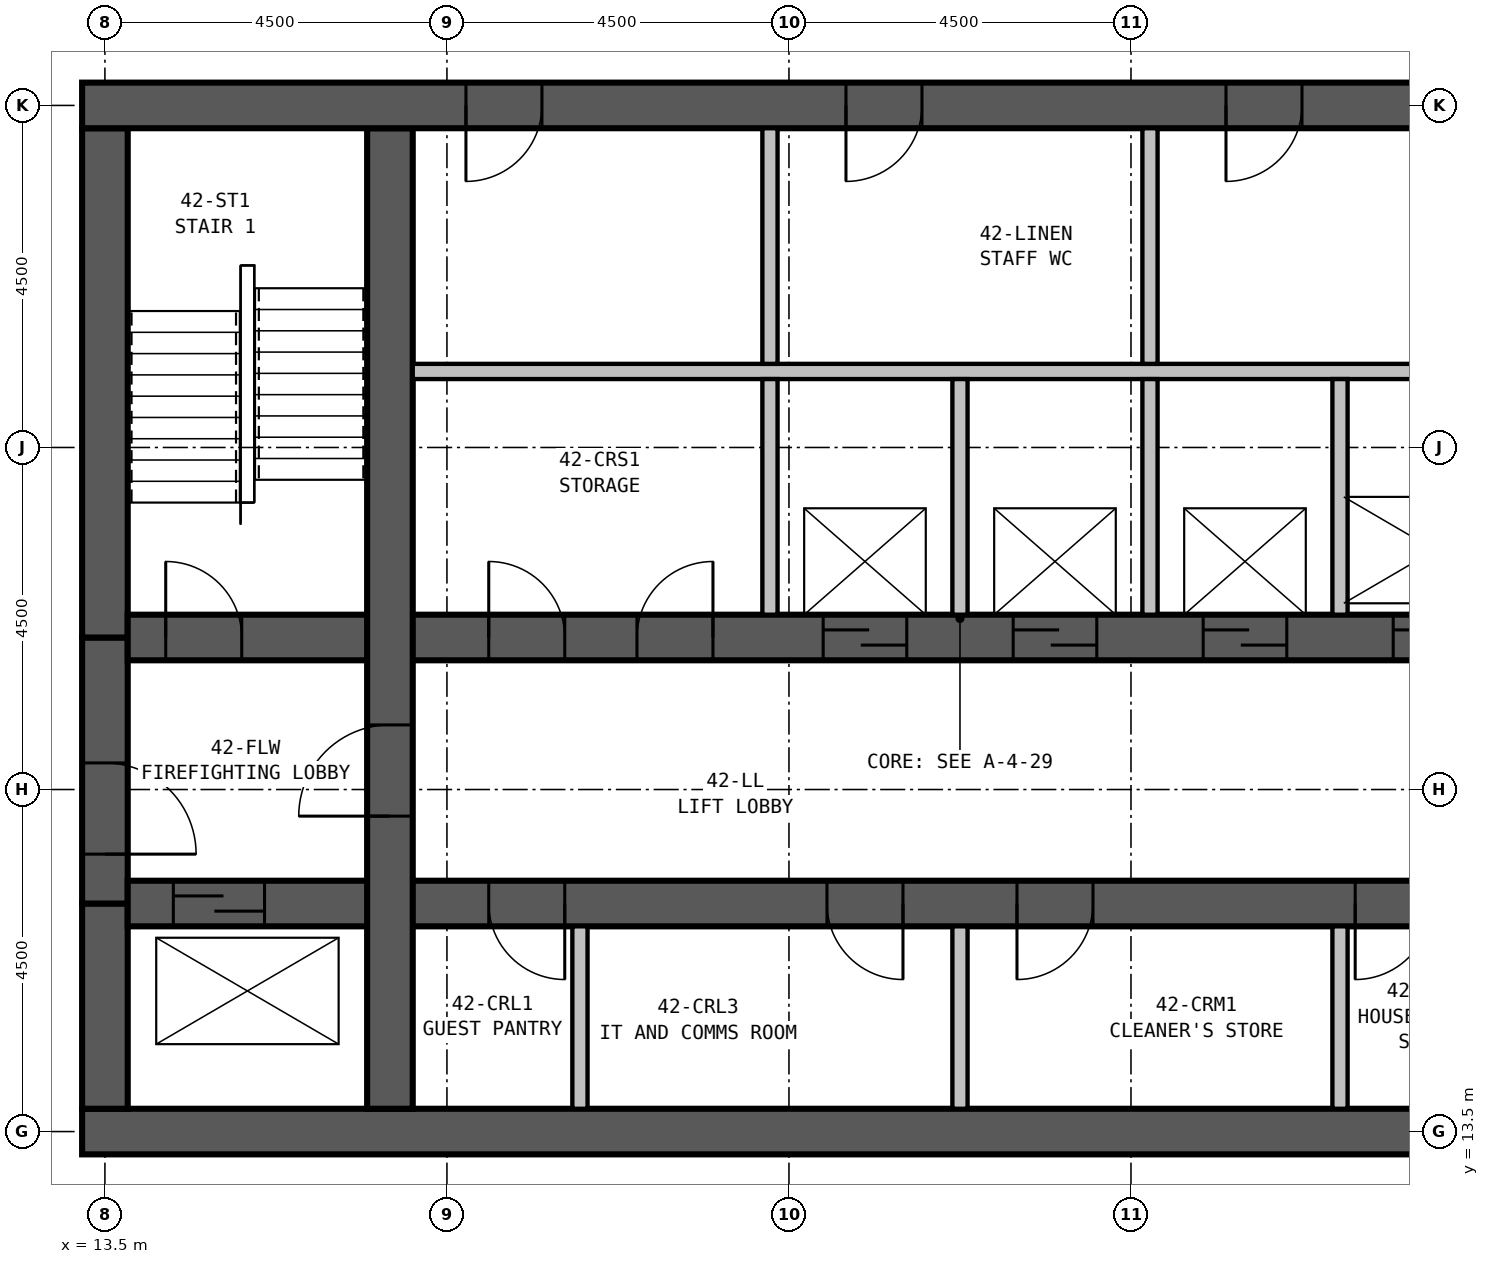
"""IFC4 building model, lengths in metres.
Left out: names, types, materials, properties, quantities, classifications, styles, units other than length and angle.
Written with IfcOpenShell. Run it as: python <this file> out.ifc"""

import sys

from ifc_helpers import new_model, si_unit, direction, frame, frame_2d, origin, place, context, subcontext, project, spatial, rectangle, extrude, element, fill, save


model = new_model("IFC4")
c1 = context("Model", 3, precision=1e-05, world=origin(), true_north=direction((0.0, 1.0)))
c2 = subcontext(c1, "Body", "Model", "MODEL_VIEW")
j1 = project(units=[si_unit("LENGTHUNIT", "METRE"), si_unit("PLANEANGLEUNIT", "RADIAN")], contexts=[c1])
p1 = place(None, origin())
s1 = spatial("IfcSite", under=j1, at=p1, CompositionType="ELEMENT")
p2 = place(p1, origin())
s2 = spatial("IfcBuilding", under=s1, at=p2, CompositionType="ELEMENT")
p3 = place(p2, frame((0.0, 0.0, 165.9)))
s3 = spatial("IfcBuildingStorey", under=s2, at=p3, CompositionType="ELEMENT", Elevation=165.9)
p4 = place(p3, frame((13.2, 13.5, 0.0), z_axis=(0.0, 0.0, 1.0), x_axis=(1.0, 0.0, 0.0)))
e1 = element("IfcWall", 1, at=p4, inside=s3, PredefinedType="SHEAR", context=c2, shape_type="SweptSolid", body=[
    extrude(rectangle(XDim=23.1, YDim=0.6, at=frame_2d((11.55, 0.0))), origin(), (0.0, 0.0, 1.0), 3.5),
])
p5 = place(p3, frame((36.3, 27.0, 0.0), z_axis=(0.0, 0.0, 1.0), x_axis=(-1.0, 0.0, 0.0)))
e2 = element("IfcWall", 2, at=p5, inside=s3, PredefinedType="SHEAR", context=c2, shape_type="SweptSolid", body=[
    extrude(rectangle(XDim=23.1, YDim=0.6, at=frame_2d((11.55, 0.0))), origin(), (0.0, 0.0, 1.0), 3.5),
])
p6 = place(p5, frame((17.05, 0.0, 0.0)))
e3 = element("IfcOpeningElement", 3, at=p6, cuts=e2, PredefinedType="OPENING", context=c2, shape_type="SweptSolid", body=[
    extrude(rectangle(XDim=1.0, YDim=2.1, at=frame_2d((0.5, 1.05))), frame((0.0, 0.31, 0.0), z_axis=(0.0, -1.0, 0.0), x_axis=(1.0, 0.0, 0.0)), (0.0, 0.0, 1.0), 0.62),
])
p7 = place(p5, frame((12.05, 0.0, 0.0)))
e4 = element("IfcOpeningElement", 4, at=p7, cuts=e2, PredefinedType="OPENING", context=c2, shape_type="SweptSolid", body=[
    extrude(rectangle(XDim=1.0, YDim=2.1, at=frame_2d((0.5, 1.05))), frame((0.0, 0.31, 0.0), z_axis=(0.0, -1.0, 0.0), x_axis=(1.0, 0.0, 0.0)), (0.0, 0.0, 1.0), 0.62),
])
p8 = place(p5, frame((7.05, 0.0, 0.0)))
e5 = element("IfcOpeningElement", 5, at=p8, cuts=e2, PredefinedType="OPENING", context=c2, shape_type="SweptSolid", body=[
    extrude(rectangle(XDim=1.0, YDim=2.1, at=frame_2d((0.5, 1.05))), frame((0.0, 0.31, 0.0), z_axis=(0.0, -1.0, 0.0), x_axis=(1.0, 0.0, 0.0)), (0.0, 0.0, 1.0), 0.62),
])
p9 = place(p3, frame((17.25, 13.8, 0.0), z_axis=(0.0, 0.0, 1.0), x_axis=(0.0, 1.0, 0.0)))
e6 = element("IfcWall", 6, at=p9, inside=s3, PredefinedType="SHEAR", context=c2, shape_type="SweptSolid", body=[
    extrude(rectangle(XDim=12.9, YDim=0.6, at=frame_2d((6.45, 0.0))), origin(), (0.0, 0.0, 1.0), 3.5),
])
p10 = place(p9, frame((3.85, 0.0, 0.0)))
e7 = element("IfcOpeningElement", 7, at=p10, cuts=e6, PredefinedType="OPENING", context=c2, shape_type="SweptSolid", body=[
    extrude(rectangle(XDim=1.2, YDim=2.1, at=frame_2d((0.6, 1.05))), frame((0.0, 0.31, 0.0), z_axis=(0.0, -1.0, 0.0), x_axis=(1.0, 0.0, 0.0)), (0.0, 0.0, 1.0), 0.62),
])
p11 = place(p3, frame((13.8, 16.5, 0.0), z_axis=(0.0, 0.0, 1.0), x_axis=(1.0, 0.0, 0.0)))
e8 = element("IfcWall", 8, at=p11, inside=s3, PredefinedType="SHEAR", context=c2, shape_type="SweptSolid", body=[
    extrude(rectangle(XDim=21.9, YDim=0.6, at=frame_2d((10.95, 0.0))), origin(), (0.0, 0.0, 1.0), 3.5),
])
p12 = place(p11, frame((5.75, 0.0, 0.0), z_axis=(0.0, 0.0, 1.0), x_axis=(-1.0, 0.0, 0.0)))
e9 = element("IfcOpeningElement", 9, at=p12, cuts=e8, PredefinedType="OPENING", context=c2, shape_type="SweptSolid", body=[
    extrude(rectangle(XDim=1.0, YDim=2.1, at=frame_2d((0.5, 1.05))), frame((0.0, 0.31, 0.0), z_axis=(0.0, -1.0, 0.0), x_axis=(1.0, 0.0, 0.0)), (0.0, 0.0, 1.0), 0.62),
])
p13 = place(p11, frame((10.2, 0.0, 0.0), z_axis=(0.0, 0.0, 1.0), x_axis=(-1.0, 0.0, 0.0)))
e10 = element("IfcOpeningElement", 10, at=p13, cuts=e8, PredefinedType="OPENING", context=c2, shape_type="SweptSolid", body=[
    extrude(rectangle(XDim=1.0, YDim=2.1, at=frame_2d((0.5, 1.05))), frame((0.0, 0.31, 0.0), z_axis=(0.0, -1.0, 0.0), x_axis=(1.0, 0.0, 0.0)), (0.0, 0.0, 1.0), 0.62),
])
p14 = place(p11, frame((12.7, 0.0, 0.0), z_axis=(0.0, 0.0, 1.0), x_axis=(-1.0, 0.0, 0.0)))
e11 = element("IfcOpeningElement", 11, at=p14, cuts=e8, PredefinedType="OPENING", context=c2, shape_type="SweptSolid", body=[
    extrude(rectangle(XDim=1.0, YDim=2.1, at=frame_2d((0.5, 1.05))), frame((0.0, 0.31, 0.0), z_axis=(0.0, -1.0, 0.0), x_axis=(1.0, 0.0, 0.0)), (0.0, 0.0, 1.0), 0.62),
])
p15 = place(p11, frame((17.15, 0.0, 0.0), z_axis=(0.0, 0.0, 1.0), x_axis=(-1.0, 0.0, 0.0)))
e12 = element("IfcOpeningElement", 12, at=p15, cuts=e8, PredefinedType="OPENING", context=c2, shape_type="SweptSolid", body=[
    extrude(rectangle(XDim=1.0, YDim=2.1, at=frame_2d((0.5, 1.05))), frame((0.0, 0.31, 0.0), z_axis=(0.0, -1.0, 0.0), x_axis=(1.0, 0.0, 0.0)), (0.0, 0.0, 1.0), 0.62),
])
p16 = place(p11, frame((0.6, 0.0, 0.0)))
e13 = element("IfcOpeningElement", 13, at=p16, cuts=e8, PredefinedType="OPENING", context=c2, shape_type="SweptSolid", body=[
    extrude(rectangle(XDim=1.2, YDim=2.1, at=frame_2d((0.6, 1.05))), frame((0.0, 0.31, 0.0), z_axis=(0.0, -1.0, 0.0), x_axis=(1.0, 0.0, 0.0)), (0.0, 0.0, 1.0), 0.62),
])
p17 = place(p11, frame((19.6, 0.0, 0.0)))
e14 = element("IfcOpeningElement", 14, at=p17, cuts=e8, PredefinedType="OPENING", context=c2, shape_type="SweptSolid", body=[
    extrude(rectangle(XDim=1.2, YDim=2.1, at=frame_2d((0.6, 1.05))), frame((0.0, 0.31, 0.0), z_axis=(0.0, -1.0, 0.0), x_axis=(1.0, 0.0, 0.0)), (0.0, 0.0, 1.0), 0.62),
])
p18 = place(p3, frame((13.8, 20.0, 0.0), z_axis=(0.0, 0.0, 1.0), x_axis=(1.0, 0.0, 0.0)))
e15 = element("IfcWall", 15, at=p18, inside=s3, PredefinedType="SHEAR", context=c2, shape_type="SweptSolid", body=[
    extrude(rectangle(XDim=21.9, YDim=0.6, at=frame_2d((10.95, 0.0))), origin(), (0.0, 0.0, 1.0), 3.5),
])
p19 = place(p18, frame((0.5, 0.0, 0.0)))
e16 = element("IfcOpeningElement", 16, at=p19, cuts=e15, PredefinedType="OPENING", context=c2, shape_type="SweptSolid", body=[
    extrude(rectangle(XDim=1.0, YDim=2.1, at=frame_2d((0.5, 1.05))), frame((0.0, 0.31, 0.0), z_axis=(0.0, -1.0, 0.0), x_axis=(1.0, 0.0, 0.0)), (0.0, 0.0, 1.0), 0.62),
])
p20 = place(p18, frame((20.5, 0.0, 0.0)))
e17 = element("IfcOpeningElement", 17, at=p20, cuts=e15, PredefinedType="OPENING", context=c2, shape_type="SweptSolid", body=[
    extrude(rectangle(XDim=1.0, YDim=2.1, at=frame_2d((0.5, 1.05))), frame((0.0, 0.31, 0.0), z_axis=(0.0, -1.0, 0.0), x_axis=(1.0, 0.0, 0.0)), (0.0, 0.0, 1.0), 0.62),
])
p21 = place(p18, frame((9.15, 0.0, 0.0)))
e18 = element("IfcOpeningElement", 18, at=p21, cuts=e15, PredefinedType="OPENING", context=c2, shape_type="SweptSolid", body=[
    extrude(rectangle(XDim=1.1, YDim=2.1, at=frame_2d((0.55, 1.05))), frame((0.0, 0.31, 0.0), z_axis=(0.0, -1.0, 0.0), x_axis=(1.0, 0.0, 0.0)), (0.0, 0.0, 1.0), 0.62),
])
p22 = place(p18, frame((11.65, 0.0, 0.0)))
e19 = element("IfcOpeningElement", 19, at=p22, cuts=e15, PredefinedType="OPENING", context=c2, shape_type="SweptSolid", body=[
    extrude(rectangle(XDim=1.1, YDim=2.1, at=frame_2d((0.55, 1.05))), frame((0.0, 0.31, 0.0), z_axis=(0.0, -1.0, 0.0), x_axis=(1.0, 0.0, 0.0)), (0.0, 0.0, 1.0), 0.62),
])
p23 = place(p18, frame((14.15, 0.0, 0.0)))
e20 = element("IfcOpeningElement", 20, at=p23, cuts=e15, PredefinedType="OPENING", context=c2, shape_type="SweptSolid", body=[
    extrude(rectangle(XDim=1.1, YDim=2.1, at=frame_2d((0.55, 1.05))), frame((0.0, 0.31, 0.0), z_axis=(0.0, -1.0, 0.0), x_axis=(1.0, 0.0, 0.0)), (0.0, 0.0, 1.0), 0.62),
])
p24 = place(p18, frame((16.65, 0.0, 0.0)))
e21 = element("IfcOpeningElement", 21, at=p24, cuts=e15, PredefinedType="OPENING", context=c2, shape_type="SweptSolid", body=[
    extrude(rectangle(XDim=1.1, YDim=2.1, at=frame_2d((0.55, 1.05))), frame((0.0, 0.31, 0.0), z_axis=(0.0, -1.0, 0.0), x_axis=(1.0, 0.0, 0.0)), (0.0, 0.0, 1.0), 0.62),
])
p25 = place(p18, frame((4.75, 0.0, 0.0)))
e22 = element("IfcOpeningElement", 22, at=p25, cuts=e15, PredefinedType="OPENING", context=c2, shape_type="SweptSolid", body=[
    extrude(rectangle(XDim=1.0, YDim=2.1, at=frame_2d((0.5, 1.05))), frame((0.0, 0.31, 0.0), z_axis=(0.0, -1.0, 0.0), x_axis=(1.0, 0.0, 0.0)), (0.0, 0.0, 1.0), 0.62),
])
p26 = place(p18, frame((6.7, 0.0, 0.0)))
e23 = element("IfcOpeningElement", 23, at=p26, cuts=e15, PredefinedType="OPENING", context=c2, shape_type="SweptSolid", body=[
    extrude(rectangle(XDim=1.0, YDim=2.1, at=frame_2d((0.5, 1.05))), frame((0.0, 0.31, 0.0), z_axis=(0.0, -1.0, 0.0), x_axis=(1.0, 0.0, 0.0)), (0.0, 0.0, 1.0), 0.62),
])
p27 = place(p3, frame((13.5, 26.7, 0.0), z_axis=(0.0, 0.0, 1.0), x_axis=(0.0, -1.0, 0.0)))
e24 = element("IfcWall", 24, at=p27, inside=s3, PredefinedType="SHEAR", context=c2, shape_type="SweptSolid", body=[
    extrude(rectangle(XDim=6.7, YDim=0.6, at=frame_2d((3.35, 0.0))), origin(), (0.0, 0.0, 1.0), 3.5),
])
p28 = place(p3, frame((13.5, 20.0, 0.0), z_axis=(0.0, 0.0, 1.0), x_axis=(0.0, -1.0, 0.0)))
e25 = element("IfcWall", 25, at=p28, inside=s3, PredefinedType="SHEAR", context=c2, shape_type="SweptSolid", body=[
    extrude(rectangle(XDim=3.5, YDim=0.6, at=frame_2d((1.75, 0.0))), origin(), (0.0, 0.0, 1.0), 3.5),
])
p29 = place(p28, frame((1.65, 0.0, 0.0)))
e26 = element("IfcOpeningElement", 26, at=p29, cuts=e25, PredefinedType="OPENING", context=c2, shape_type="SweptSolid", body=[
    extrude(rectangle(XDim=1.2, YDim=2.1, at=frame_2d((0.6, 1.05))), frame((0.0, 0.31, 0.0), z_axis=(0.0, -1.0, 0.0), x_axis=(1.0, 0.0, 0.0)), (0.0, 0.0, 1.0), 0.62),
])
p30 = place(p3, frame((13.5, 16.5, 0.0), z_axis=(0.0, 0.0, 1.0), x_axis=(0.0, -1.0, 0.0)))
e27 = element("IfcWall", 27, at=p30, inside=s3, PredefinedType="SHEAR", context=c2, shape_type="SweptSolid", body=[
    extrude(rectangle(XDim=2.7, YDim=0.6, at=frame_2d((1.35, 0.0))), origin(), (0.0, 0.0, 1.0), 3.5),
])
p31 = place(p3, frame((19.75, 13.8, 0.0), z_axis=(0.0, 0.0, 1.0), x_axis=(0.0, 1.0, 0.0)))
e28 = element("IfcWall", 28, at=p31, inside=s3, PredefinedType="PARTITIONING", context=c2, shape_type="SweptSolid", body=[
    extrude(rectangle(XDim=2.4, YDim=0.2, at=frame_2d((1.2, 0.0))), origin(), (0.0, 0.0, 1.0), 3.25),
])
p32 = place(p3, frame((22.25, 20.3, 0.0), z_axis=(0.0, 0.0, 1.0), x_axis=(0.0, 1.0, 0.0)))
e29 = element("IfcWall", 29, at=p32, inside=s3, PredefinedType="PARTITIONING", context=c2, shape_type="SweptSolid", body=[
    extrude(rectangle(XDim=3.1, YDim=0.2, at=frame_2d((1.55, 0.0))), origin(), (0.0, 0.0, 1.0), 3.25),
])
p33 = place(p3, frame((24.75, 13.8, 0.0), z_axis=(0.0, 0.0, 1.0), x_axis=(0.0, 1.0, 0.0)))
e30 = element("IfcWall", 30, at=p33, inside=s3, PredefinedType="PARTITIONING", context=c2, shape_type="SweptSolid", body=[
    extrude(rectangle(XDim=2.4, YDim=0.2, at=frame_2d((1.2, 0.0))), origin(), (0.0, 0.0, 1.0), 3.25),
])
for number, where, z_axis, x_axis in (
    (31, (24.75, 20.3, 0.0), (0.0, 0.0, 1.0), (0.0, 1.0, 0.0)),
    (32, (27.25, 20.3, 0.0), (0.0, 0.0, 1.0), (0.0, 1.0, 0.0)),
):
    element("IfcWall", number, at=place(p3, frame(where, z_axis=z_axis, x_axis=x_axis)), inside=s3, PredefinedType="PARTITIONING", context=c2, shape_type="SweptSolid", body=[
        extrude(rectangle(XDim=3.1, YDim=0.2, at=frame_2d((1.55, 0.0))), origin(), (0.0, 0.0, 1.0), 3.25),
    ])
p34 = place(p3, frame((29.75, 13.8, 0.0), z_axis=(0.0, 0.0, 1.0), x_axis=(0.0, 1.0, 0.0)))
e33 = element("IfcWall", 33, at=p34, inside=s3, PredefinedType="PARTITIONING", context=c2, shape_type="SweptSolid", body=[
    extrude(rectangle(XDim=2.4, YDim=0.2, at=frame_2d((1.2, 0.0))), origin(), (0.0, 0.0, 1.0), 3.25),
])
p35 = place(p3, frame((29.75, 20.3, 0.0), z_axis=(0.0, 0.0, 1.0), x_axis=(0.0, 1.0, 0.0)))
e34 = element("IfcWall", 34, at=p35, inside=s3, PredefinedType="PARTITIONING", context=c2, shape_type="SweptSolid", body=[
    extrude(rectangle(XDim=3.1, YDim=0.2, at=frame_2d((1.55, 0.0))), origin(), (0.0, 0.0, 1.0), 3.25),
])
p36 = place(p3, frame((17.55, 23.5, 0.0), z_axis=(0.0, 0.0, 1.0), x_axis=(1.0, 0.0, 0.0)))
e35 = element("IfcWall", 35, at=p36, inside=s3, PredefinedType="PARTITIONING", context=c2, shape_type="SweptSolid", body=[
    extrude(rectangle(XDim=14.4, YDim=0.2, at=frame_2d((7.2, 0.0))), origin(), (0.0, 0.0, 1.0), 3.25),
])
for number, where, z_axis, x_axis in (
    (36, (22.25, 23.6, 0.0), (0.0, 0.0, 1.0), (0.0, 1.0, 0.0)),
    (37, (27.25, 23.6, 0.0), (0.0, 0.0, 1.0), (0.0, 1.0, 0.0)),
):
    element("IfcWall", number, at=place(p3, frame(where, z_axis=z_axis, x_axis=x_axis)), inside=s3, PredefinedType="PARTITIONING", context=c2, shape_type="SweptSolid", body=[
        extrude(rectangle(XDim=3.1, YDim=0.2, at=frame_2d((1.55, 0.0))), origin(), (0.0, 0.0, 1.0), 3.25),
    ])
p37 = place(p29, origin())
e38 = element("IfcDoor", 38, at=p37, inside=s3, OperationType="SINGLE_SWING_RIGHT", PredefinedType="DOOR", context=c2, shape_type="SweptSolid", body=[
    extrude(rectangle(XDim=1.2, YDim=2.1, at=frame_2d((0.6, 1.05))), frame((0.0, 0.3, 0.0), z_axis=(0.0, -1.0, 0.0), x_axis=(1.0, 0.0, 0.0)), (0.0, 0.0, 1.0), 0.6),
])
fill(e26, e38)
p38 = place(p10, origin())
e39 = element("IfcDoor", 39, at=p38, inside=s3, OperationType="SINGLE_SWING_LEFT", PredefinedType="DOOR", context=c2, shape_type="SweptSolid", body=[
    extrude(rectangle(XDim=1.2, YDim=2.1, at=frame_2d((0.6, 1.05))), frame((0.0, 0.3, 0.0), z_axis=(0.0, -1.0, 0.0), x_axis=(1.0, 0.0, 0.0)), (0.0, 0.0, 1.0), 0.6),
])
fill(e7, e39)
p39 = place(p19, origin())
e40 = element("IfcDoor", 40, at=p39, inside=s3, OperationType="SINGLE_SWING_LEFT", PredefinedType="DOOR", context=c2, shape_type="SweptSolid", body=[
    extrude(rectangle(XDim=1.0, YDim=2.1, at=frame_2d((0.5, 1.05))), frame((0.0, 0.3, 0.0), z_axis=(0.0, -1.0, 0.0), x_axis=(1.0, 0.0, 0.0)), (0.0, 0.0, 1.0), 0.6),
])
fill(e16, e40)
p40 = place(p21, origin())
e41 = element("IfcDoor", 41, at=p40, inside=s3, OperationType="SLIDING_TO_LEFT", PredefinedType="DOOR", context=c2, shape_type="SweptSolid", body=[
    extrude(rectangle(XDim=1.1, YDim=2.1, at=frame_2d((0.55, 1.05))), frame((0.0, 0.3, 0.0), z_axis=(0.0, -1.0, 0.0), x_axis=(1.0, 0.0, 0.0)), (0.0, 0.0, 1.0), 0.6),
])
fill(e18, e41)
p41 = place(p22, origin())
e42 = element("IfcDoor", 42, at=p41, inside=s3, OperationType="SLIDING_TO_LEFT", PredefinedType="DOOR", context=c2, shape_type="SweptSolid", body=[
    extrude(rectangle(XDim=1.1, YDim=2.1, at=frame_2d((0.55, 1.05))), frame((0.0, 0.3, 0.0), z_axis=(0.0, -1.0, 0.0), x_axis=(1.0, 0.0, 0.0)), (0.0, 0.0, 1.0), 0.6),
])
fill(e19, e42)
p42 = place(p23, origin())
e43 = element("IfcDoor", 43, at=p42, inside=s3, OperationType="SLIDING_TO_LEFT", PredefinedType="DOOR", context=c2, shape_type="SweptSolid", body=[
    extrude(rectangle(XDim=1.1, YDim=2.1, at=frame_2d((0.55, 1.05))), frame((0.0, 0.3, 0.0), z_axis=(0.0, -1.0, 0.0), x_axis=(1.0, 0.0, 0.0)), (0.0, 0.0, 1.0), 0.6),
])
fill(e20, e43)
p43 = place(p24, origin())
e44 = element("IfcDoor", 44, at=p43, inside=s3, OperationType="SLIDING_TO_LEFT", PredefinedType="DOOR", context=c2, shape_type="SweptSolid", body=[
    extrude(rectangle(XDim=1.1, YDim=2.1, at=frame_2d((0.55, 1.05))), frame((0.0, 0.3, 0.0), z_axis=(0.0, -1.0, 0.0), x_axis=(1.0, 0.0, 0.0)), (0.0, 0.0, 1.0), 0.6),
])
fill(e21, e44)
p44 = place(p12, origin())
e45 = element("IfcDoor", 45, at=p44, inside=s3, OperationType="SINGLE_SWING_LEFT", PredefinedType="DOOR", context=c2, shape_type="SweptSolid", body=[
    extrude(rectangle(XDim=1.0, YDim=2.1, at=frame_2d((0.5, 1.05))), frame((0.0, 0.3, 0.0), z_axis=(0.0, -1.0, 0.0), x_axis=(1.0, 0.0, 0.0)), (0.0, 0.0, 1.0), 0.6),
])
fill(e9, e45)
p45 = place(p13, origin())
e46 = element("IfcDoor", 46, at=p45, inside=s3, OperationType="SINGLE_SWING_LEFT", PredefinedType="DOOR", context=c2, shape_type="SweptSolid", body=[
    extrude(rectangle(XDim=1.0, YDim=2.1, at=frame_2d((0.5, 1.05))), frame((0.0, 0.3, 0.0), z_axis=(0.0, -1.0, 0.0), x_axis=(1.0, 0.0, 0.0)), (0.0, 0.0, 1.0), 0.6),
])
fill(e10, e46)
p46 = place(p14, origin())
e47 = element("IfcDoor", 47, at=p46, inside=s3, OperationType="SINGLE_SWING_RIGHT", PredefinedType="DOOR", context=c2, shape_type="SweptSolid", body=[
    extrude(rectangle(XDim=1.0, YDim=2.1, at=frame_2d((0.5, 1.05))), frame((0.0, 0.3, 0.0), z_axis=(0.0, -1.0, 0.0), x_axis=(1.0, 0.0, 0.0)), (0.0, 0.0, 1.0), 0.6),
])
fill(e11, e47)
p47 = place(p15, origin())
e48 = element("IfcDoor", 48, at=p47, inside=s3, OperationType="SINGLE_SWING_RIGHT", PredefinedType="DOOR", context=c2, shape_type="SweptSolid", body=[
    extrude(rectangle(XDim=1.0, YDim=2.1, at=frame_2d((0.5, 1.05))), frame((0.0, 0.3, 0.0), z_axis=(0.0, -1.0, 0.0), x_axis=(1.0, 0.0, 0.0)), (0.0, 0.0, 1.0), 0.6),
])
fill(e12, e48)
p48 = place(p25, origin())
e49 = element("IfcDoor", 49, at=p48, inside=s3, OperationType="SINGLE_SWING_LEFT", PredefinedType="DOOR", context=c2, shape_type="SweptSolid", body=[
    extrude(rectangle(XDim=1.0, YDim=2.1, at=frame_2d((0.5, 1.05))), frame((0.0, 0.3, 0.0), z_axis=(0.0, -1.0, 0.0), x_axis=(1.0, 0.0, 0.0)), (0.0, 0.0, 1.0), 0.6),
])
fill(e22, e49)
p49 = place(p26, origin())
e50 = element("IfcDoor", 50, at=p49, inside=s3, OperationType="SINGLE_SWING_RIGHT", PredefinedType="DOOR", context=c2, shape_type="SweptSolid", body=[
    extrude(rectangle(XDim=1.0, YDim=2.1, at=frame_2d((0.5, 1.05))), frame((0.0, 0.3, 0.0), z_axis=(0.0, -1.0, 0.0), x_axis=(1.0, 0.0, 0.0)), (0.0, 0.0, 1.0), 0.6),
])
fill(e23, e50)
p50 = place(p16, origin())
e51 = element("IfcDoor", 51, at=p50, inside=s3, OperationType="SLIDING_TO_LEFT", PredefinedType="DOOR", context=c2, shape_type="SweptSolid", body=[
    extrude(rectangle(XDim=1.2, YDim=2.1, at=frame_2d((0.6, 1.05))), frame((0.0, 0.3, 0.0), z_axis=(0.0, -1.0, 0.0), x_axis=(1.0, 0.0, 0.0)), (0.0, 0.0, 1.0), 0.6),
])
fill(e13, e51)
p51 = place(p6, origin())
e52 = element("IfcDoor", 52, at=p51, inside=s3, OperationType="SINGLE_SWING_RIGHT", PredefinedType="DOOR", context=c2, shape_type="SweptSolid", body=[
    extrude(rectangle(XDim=1.0, YDim=2.1, at=frame_2d((0.5, 1.05))), frame((0.0, 0.3, 0.0), z_axis=(0.0, -1.0, 0.0), x_axis=(1.0, 0.0, 0.0)), (0.0, 0.0, 1.0), 0.6),
])
fill(e3, e52)
p52 = place(p7, origin())
e53 = element("IfcDoor", 53, at=p52, inside=s3, OperationType="SINGLE_SWING_RIGHT", PredefinedType="DOOR", context=c2, shape_type="SweptSolid", body=[
    extrude(rectangle(XDim=1.0, YDim=2.1, at=frame_2d((0.5, 1.05))), frame((0.0, 0.3, 0.0), z_axis=(0.0, -1.0, 0.0), x_axis=(1.0, 0.0, 0.0)), (0.0, 0.0, 1.0), 0.6),
])
fill(e4, e53)
p53 = place(p8, origin())
e54 = element("IfcDoor", 54, at=p53, inside=s3, OperationType="SINGLE_SWING_RIGHT", PredefinedType="DOOR", context=c2, shape_type="SweptSolid", body=[
    extrude(rectangle(XDim=1.0, YDim=2.1, at=frame_2d((0.5, 1.05))), frame((0.0, 0.3, 0.0), z_axis=(0.0, -1.0, 0.0), x_axis=(1.0, 0.0, 0.0)), (0.0, 0.0, 1.0), 0.6),
])
fill(e5, e54)
save(model, sys.argv[1])
